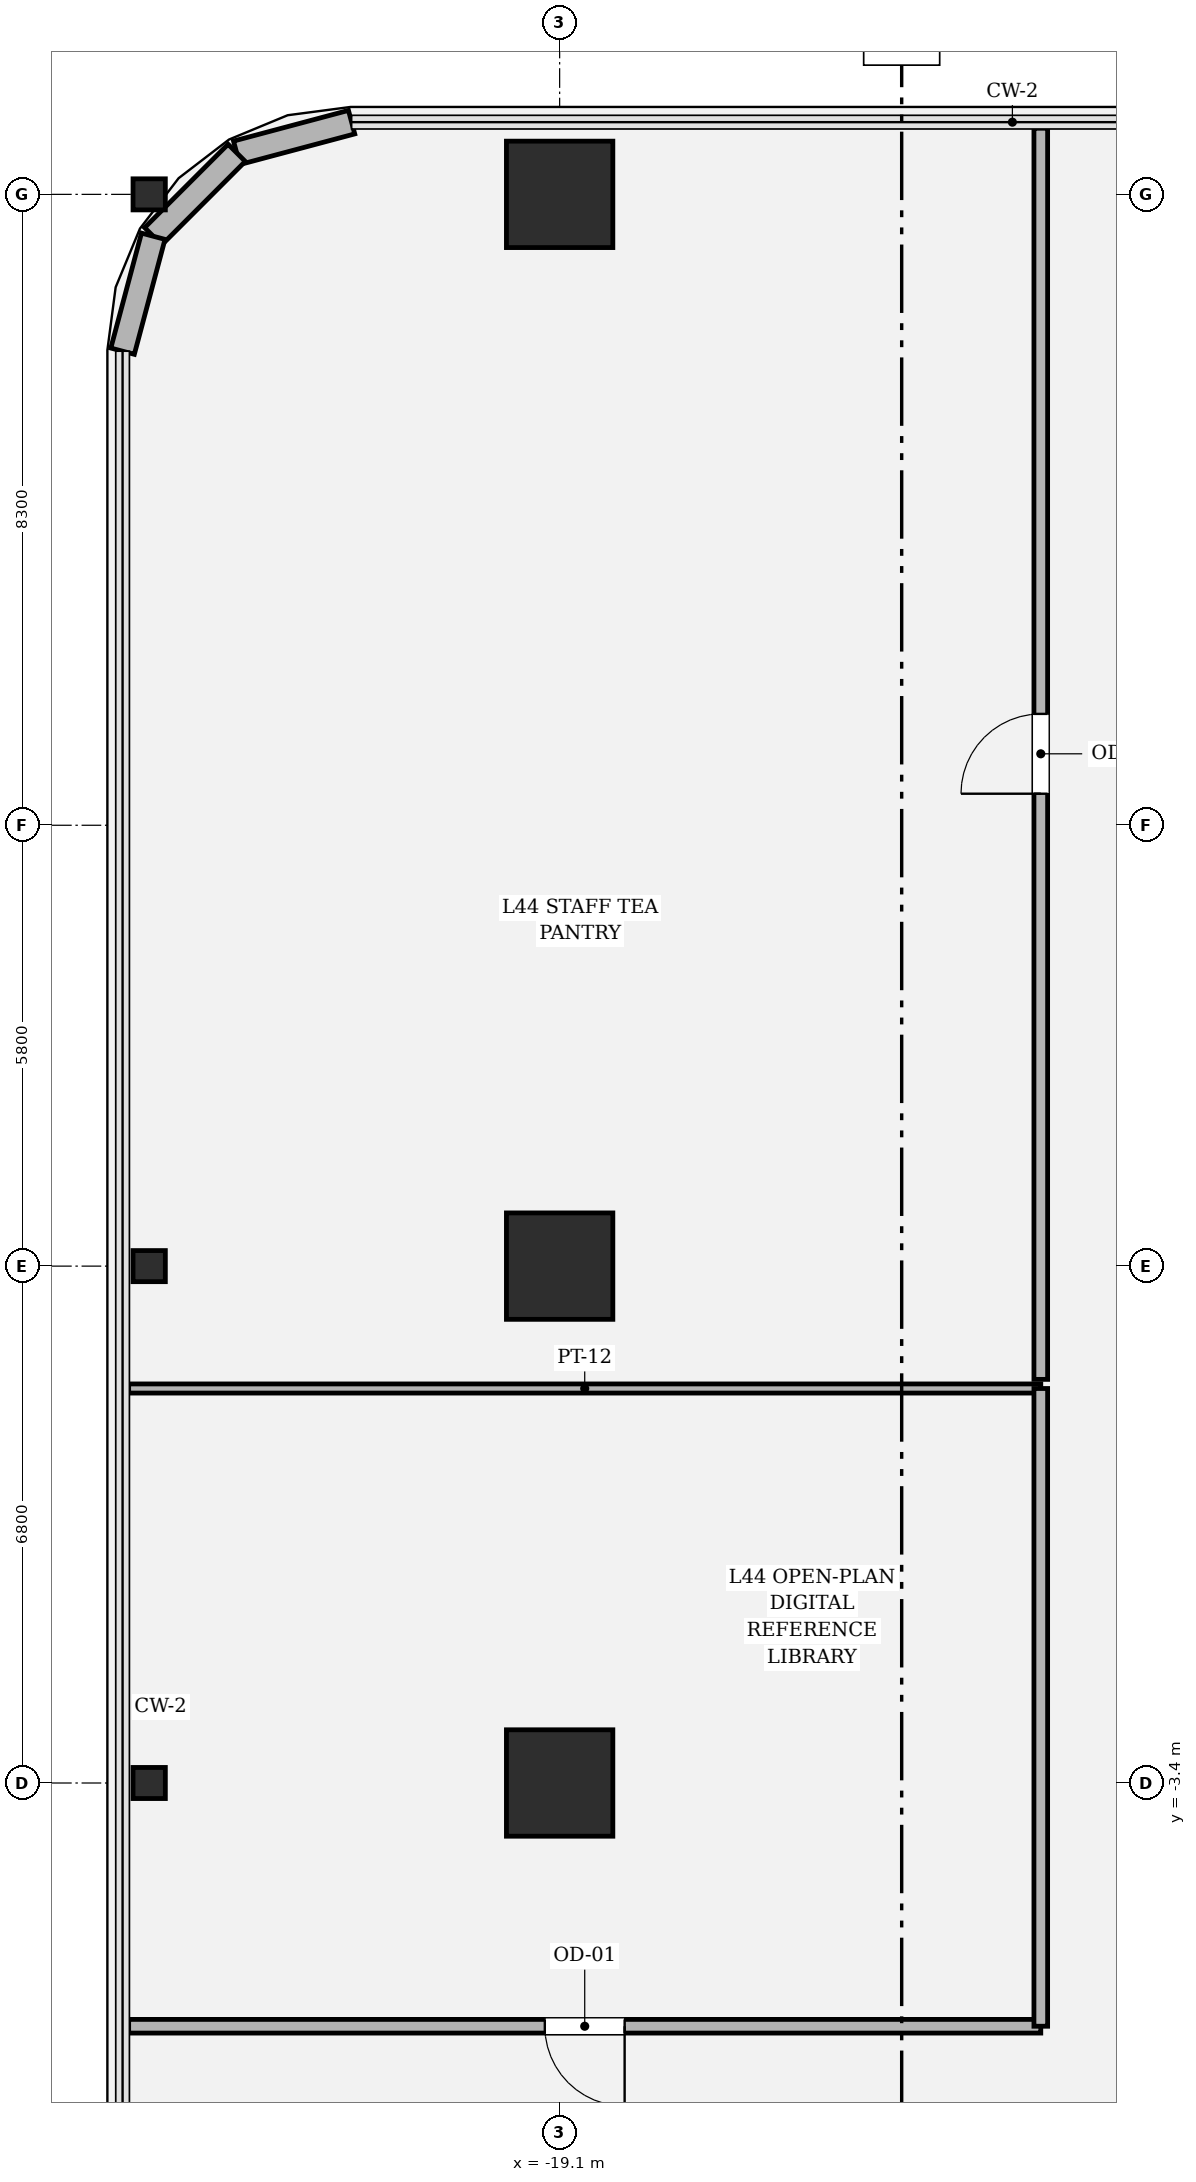
"""IFC4 building model, lengths in metres.
Left out: names, types, materials, properties, quantities, classifications, styles, units other than length and angle.
Written with IfcOpenShell. Run it as: python <this file> out.ifc"""

import sys

from ifc_helpers import new_model, si_unit, direction, frame, frame_2d, origin, origin_2d, place, context, subcontext, project, spatial, rectangle, hollow_rectangle, i_section, extrude, element, fill, save


model = new_model("IFC4")
c1 = context("Model", 3, precision=1e-05, world=origin(), true_north=direction((0.0, 1.0)))
c2 = subcontext(c1, "Body", "Model", "MODEL_VIEW")
j1 = project(units=[si_unit("LENGTHUNIT", "METRE"), si_unit("PLANEANGLEUNIT", "RADIAN")], contexts=[c1])
p1 = place(None, origin())
s1 = spatial("IfcSite", under=j1, at=p1, CompositionType="ELEMENT")
p2 = place(p1, origin())
s2 = spatial("IfcBuilding", under=s1, at=p2, CompositionType="ELEMENT")
p3 = place(p2, frame((0.0, 0.0, 188.4)))
s3 = spatial("IfcBuildingStorey", under=s2, at=p3, CompositionType="ELEMENT", Elevation=188.4)
for number, where, z_axis, x_axis in (
    (1, (-19.1, 17.5, 0.0), (0.0, 0.0, 1.0), (1.0, 0.0, 0.0)),
    (2, (-19.1, 3.4, 0.0), (0.0, 0.0, 1.0), (1.0, 0.0, 0.0)),
    (3, (-19.1, -3.4, 0.0), (0.0, 0.0, 1.0), (1.0, 0.0, 0.0)),
):
    element("IfcColumn", number, at=place(p3, frame(where, z_axis=z_axis, x_axis=x_axis)), inside=s3, PredefinedType="COLUMN", context=c2, shape_type="SweptSolid", body=[
        extrude(hollow_rectangle(XDim=1.4, YDim=1.4, WallThickness=0.042, at=origin_2d()), origin(), (0.0, 0.0, 1.0), 4.05),
    ])
for number, where, z_axis, x_axis in (
    (4, (-24.5, -3.4, 0.0), (0.0, 0.0, 1.0), (0.0, 1.0, 0.0)),
    (5, (-24.5, 3.4, 0.0), (0.0, 0.0, 1.0), (0.0, 1.0, 0.0)),
    (6, (-24.5, 17.5, 0.0), (0.0, 0.0, 1.0), (0.0, 1.0, 0.0)),
):
    element("IfcColumn", number, at=place(p3, frame(where, z_axis=z_axis, x_axis=x_axis)), inside=s3, PredefinedType="COLUMN", context=c2, shape_type="SweptSolid", body=[
        extrude(i_section(OverallWidth=0.409, OverallDepth=0.425, WebThickness=0.032, FlangeThickness=0.052, FilletRadius=0.018, at=origin_2d()), origin(), (0.0, 0.0, 1.0), 4.048),
    ])
p4 = place(p3, frame((-21.837, 18.45, 0.0), z_axis=(0.0, 0.0, 1.0), x_axis=(-0.966224582397, -0.257701486942, 0.0)))
e7 = element("IfcWall", 7, at=p4, inside=s3, PredefinedType="SOLIDWALL", context=c2, shape_type="SweptSolid", body=[
    extrude(rectangle(XDim=1.565, YDim=0.32, at=frame_2d((0.783, 0.0))), origin(), (0.0, 0.0, 1.0), 3.83),
])
p5 = place(p3, frame((-23.349, 18.047, 0.0), z_axis=(0.0, 0.0, 1.0), x_axis=(-0.707106781187, -0.707106781187, 0.0)))
e8 = element("IfcWall", 8, at=p5, inside=s3, PredefinedType="SOLIDWALL", context=c2, shape_type="SweptSolid", body=[
    extrude(rectangle(XDim=1.552, YDim=0.32, at=frame_2d((0.776, 0.0))), origin(), (0.0, 0.0, 1.0), 2.504),
])
p6 = place(p3, frame((-24.447, 16.949, 0.0), z_axis=(0.0, 0.0, 1.0), x_axis=(-0.257847112249, -0.966185730957, 0.0)))
e9 = element("IfcWall", 9, at=p6, inside=s3, PredefinedType="SOLIDWALL", context=c2, shape_type="SweptSolid", body=[
    extrude(rectangle(XDim=1.565, YDim=0.32, at=frame_2d((0.783, 0.0))), origin(), (0.0, 0.0, 1.0), 2.544),
])
p7 = place(p3, frame((-12.77, -6.6, 0.0), z_axis=(0.0, 0.0, 1.0), x_axis=(-1.0, 0.0, 0.0)))
e10 = element("IfcWall", 10, at=p7, inside=s3, PredefinedType="PARTITIONING", context=c2, shape_type="SweptSolid", body=[
    extrude(rectangle(XDim=12.0, YDim=0.18, at=frame_2d((6.0, 0.0))), origin(), (0.0, 0.0, 1.0), 2.544),
])
p8 = place(p7, frame((5.475, 0.0, 0.0)))
e11 = element("IfcOpeningElement", 11, at=p8, cuts=e10, PredefinedType="OPENING", context=c2, shape_type="SweptSolid", body=[
    extrude(rectangle(XDim=1.05, YDim=2.2, at=frame_2d((0.525, 1.1))), frame((0.0, 0.1, 0.0), z_axis=(0.0, -1.0, 0.0), x_axis=(1.0, 0.0, 0.0)), (0.0, 0.0, 1.0), 0.2),
])
p9 = place(p3, frame((-24.77, 1.79, 0.0), z_axis=(0.0, 0.0, 1.0), x_axis=(1.0, 0.0, 0.0)))
e12 = element("IfcWall", 12, at=p9, inside=s3, PredefinedType="PARTITIONING", context=c2, shape_type="SweptSolid", body=[
    extrude(rectangle(XDim=12.0, YDim=0.12, at=frame_2d((6.0, 0.0))), origin(), (0.0, 0.0, 1.0), 2.544),
])
p10 = place(p3, frame((-12.77, 1.79, 0.0), z_axis=(0.0, 0.0, 1.0), x_axis=(0.0, -1.0, 0.0)))
e13 = element("IfcWall", 13, at=p10, inside=s3, PredefinedType="PARTITIONING", context=c2, shape_type="SweptSolid", body=[
    extrude(rectangle(XDim=8.39, YDim=0.18, at=frame_2d((4.195, 0.0))), origin(), (0.0, 0.0, 1.0), 3.174),
])
p11 = place(p3, frame((-12.77, 18.37, 0.0), z_axis=(0.0, 0.0, 1.0), x_axis=(0.0, -1.0, 0.0)))
e14 = element("IfcWall", 14, at=p11, inside=s3, PredefinedType="PARTITIONING", context=c2, shape_type="SweptSolid", body=[
    extrude(rectangle(XDim=16.46, YDim=0.18, at=frame_2d((8.23, 0.0))), origin(), (0.0, 0.0, 1.0), 3.174),
])
p12 = place(p11, frame((7.705, 0.0, 0.0)))
e15 = element("IfcOpeningElement", 15, at=p12, cuts=e14, PredefinedType="OPENING", context=c2, shape_type="SweptSolid", body=[
    extrude(rectangle(XDim=1.05, YDim=2.2, at=frame_2d((0.525, 1.1))), frame((0.0, 0.1, 0.0), z_axis=(0.0, -1.0, 0.0), x_axis=(1.0, 0.0, 0.0)), (0.0, 0.0, 1.0), 0.2),
])
p13 = place(p8, origin())
e16 = element("IfcDoor", 16, at=p13, inside=s3, OperationType="SINGLE_SWING_LEFT", PredefinedType="DOOR", context=c2, shape_type="SweptSolid", body=[
    extrude(rectangle(XDim=1.05, YDim=2.2, at=frame_2d((0.525, 1.1))), frame((0.0, 0.025, 0.0), z_axis=(0.0, -1.0, 0.0), x_axis=(1.0, 0.0, 0.0)), (0.0, 0.0, 1.0), 0.05),
])
fill(e11, e16)
p14 = place(p12, origin())
e17 = element("IfcDoor", 17, at=p14, inside=s3, OperationType="SINGLE_SWING_RIGHT", PredefinedType="DOOR", context=c2, shape_type="SweptSolid", body=[
    extrude(rectangle(XDim=1.05, YDim=2.2, at=frame_2d((0.525, 1.1))), frame((0.0, 0.025, 0.0), z_axis=(0.0, -1.0, 0.0), x_axis=(1.0, 0.0, 0.0)), (0.0, 0.0, 1.0), 0.05),
])
fill(e15, e17)
save(model, sys.argv[1])
